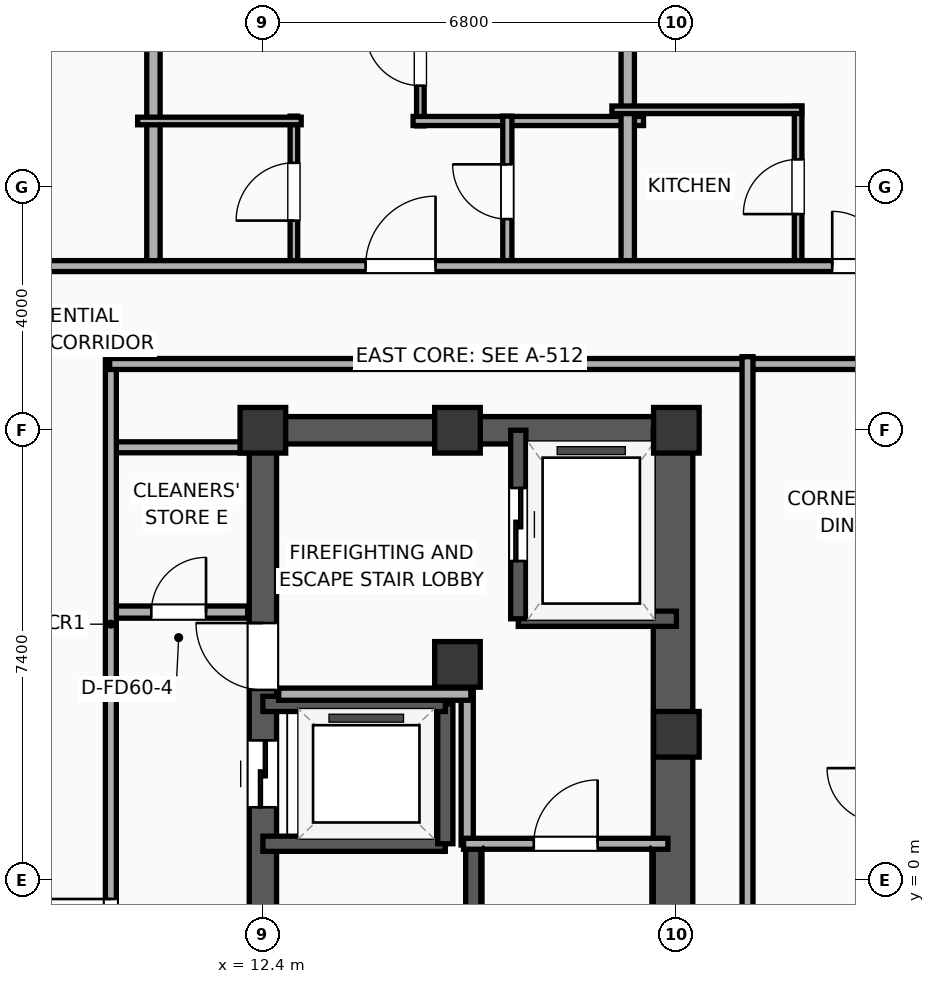
"""IFC4 building model, lengths in metres.
Left out: names, types, materials, properties, quantities, classifications, styles, units other than length and angle.
Written with IfcOpenShell. Run it as: python <this file> out.ifc"""

import sys

from ifc_helpers import new_model, si_unit, direction, frame, frame_2d, origin, origin_2d, place, context, subcontext, project, spatial, rectangle, extrude, element, fill, save


model = new_model("IFC4")
c1 = context("Model", 3, precision=1e-05, world=origin(), true_north=direction((0.0, 1.0)))
c2 = subcontext(c1, "Body", "Model", "MODEL_VIEW")
j1 = project(units=[si_unit("LENGTHUNIT", "METRE"), si_unit("PLANEANGLEUNIT", "RADIAN")], contexts=[c1])
p1 = place(None, origin())
s1 = spatial("IfcSite", under=j1, at=p1, CompositionType="ELEMENT")
p2 = place(p1, origin())
s2 = spatial("IfcBuilding", under=s1, at=p2, CompositionType="ELEMENT")
p3 = place(p2, frame((0.0, 0.0, 260.0)))
s3 = spatial("IfcBuildingStorey", under=s2, at=p3, CompositionType="ELEMENT", Elevation=260.0)
for number, where, z_axis, x_axis in (
    (1, (15.6, 3.55, 0.0), (0.0, 0.0, 1.0), (1.0, 0.0, 0.0)),
    (2, (12.4, 7.4, 0.0), (0.0, 0.0, 1.0), (1.0, 0.0, 0.0)),
    (3, (15.6, 7.4, 0.0), (0.0, 0.0, 1.0), (1.0, 0.0, 0.0)),
    (4, (19.2, 2.4, 0.0), (0.0, 0.0, 1.0), (1.0, 0.0, 0.0)),
    (5, (19.2, 7.4, 0.0), (0.0, 0.0, 1.0), (1.0, 0.0, 0.0)),
):
    element("IfcColumn", number, at=place(p3, frame(where, z_axis=z_axis, x_axis=x_axis)), inside=s3, PredefinedType="COLUMN", context=c2, shape_type="SweptSolid", body=[
        extrude(rectangle(XDim=0.75, YDim=0.75, at=origin_2d()), origin(), (0.0, 0.0, 1.0), 3.9),
    ])
p4 = place(p3, frame((12.175, 7.4, 0.0), z_axis=(0.0, 0.0, 1.0), x_axis=(1.0, 0.0, 0.0)))
e6 = element("IfcWall", 6, at=p4, inside=s3, PredefinedType="SHEAR", context=c2, shape_type="SweptSolid", body=[
    extrude(rectangle(XDim=7.25, YDim=0.45, at=frame_2d((3.625, 0.0))), origin(), (0.0, 0.0, 1.0), 3.65),
])
p5 = place(p3, frame((12.4, -7.4, 0.0), z_axis=(0.0, 0.0, 1.0), x_axis=(0.0, 1.0, 0.0)))
e7 = element("IfcWall", 7, at=p5, inside=s3, PredefinedType="SHEAR", context=c2, shape_type="SweptSolid", body=[
    extrude(rectangle(XDim=14.8, YDim=0.45, at=frame_2d((7.4, 0.0))), origin(), (0.0, 0.0, 1.0), 3.65),
])
p6 = place(p5, frame((8.6, 0.0, 0.0)))
e8 = element("IfcOpeningElement", 8, at=p6, cuts=e7, PredefinedType="OPENING", context=c2, shape_type="SweptSolid", body=[
    extrude(rectangle(XDim=1.1, YDim=2.05, at=frame_2d((0.55, 1.025))), frame((0.0, 0.235, 0.0), z_axis=(0.0, -1.0, 0.0), x_axis=(1.0, 0.0, 0.0)), (0.0, 0.0, 1.0), 0.47),
])
p7 = place(p5, frame((10.53, 0.0, 0.0)))
e9 = element("IfcOpeningElement", 9, at=p7, cuts=e7, PredefinedType="OPENING", context=c2, shape_type="SweptSolid", body=[
    extrude(rectangle(XDim=1.1, YDim=2.05, at=frame_2d((0.55, 1.025))), frame((0.0, 0.235, 0.0), z_axis=(0.0, -1.0, 0.0), x_axis=(1.0, 0.0, 0.0)), (0.0, 0.0, 1.0), 0.47),
])
p8 = place(p5, frame((3.55, 0.0, 0.0)))
e10 = element("IfcOpeningElement", 10, at=p8, cuts=e7, PredefinedType="OPENING", context=c2, shape_type="SweptSolid", body=[
    extrude(rectangle(XDim=0.9, YDim=2.05, at=frame_2d((0.45, 1.025))), frame((0.0, 0.235, 0.0), z_axis=(0.0, -1.0, 0.0), x_axis=(1.0, 0.0, 0.0)), (0.0, 0.0, 1.0), 0.47),
])
p9 = place(p3, frame((19.145, -7.4, 0.0), z_axis=(0.0, 0.0, 1.0), x_axis=(0.0, 1.0, 0.0)))
e11 = element("IfcWall", 11, at=p9, inside=s3, PredefinedType="SHEAR", context=c2, shape_type="SweptSolid", body=[
    extrude(rectangle(XDim=14.8, YDim=0.65, at=frame_2d((7.4, 0.0))), origin(), (0.0, 0.0, 1.0), 3.65),
])
p10 = place(p3, frame((15.86, -7.085, 0.0), z_axis=(0.0, 0.0, 1.0), x_axis=(0.0, 1.0, 0.0)))
e12 = element("IfcWall", 12, at=p10, inside=s3, PredefinedType="SOLIDWALL", context=c2, shape_type="SweptSolid", body=[
    extrude(rectangle(XDim=7.685, YDim=0.25, at=frame_2d((3.843, 0.0))), origin(), (0.0, 0.0, 1.0), 3.65),
])
p11 = place(p3, frame((16.6, 4.3, 0.0), z_axis=(0.0, 0.0, 1.0), x_axis=(1.0, 0.0, 0.0)))
e13 = element("IfcWall", 13, at=p11, inside=s3, PredefinedType="SOLIDWALL", context=c2, shape_type="SweptSolid", body=[
    extrude(rectangle(XDim=2.6, YDim=0.25, at=frame_2d((1.3, 0.0))), origin(), (0.0, 0.0, 1.0), 3.65),
])
p12 = place(p3, frame((16.6, 7.4, 0.0), z_axis=(0.0, 0.0, 1.0), x_axis=(0.0, -1.0, 0.0)))
e14 = element("IfcWall", 14, at=p12, inside=s3, PredefinedType="SOLIDWALL", context=c2, shape_type="SweptSolid", body=[
    extrude(rectangle(XDim=3.1, YDim=0.25, at=frame_2d((1.55, 0.0))), origin(), (0.0, 0.0, 1.0), 3.65),
])
p13 = place(p12, frame((0.95, 0.0, 0.0)))
e15 = element("IfcOpeningElement", 15, at=p13, cuts=e14, PredefinedType="OPENING", context=c2, shape_type="SweptSolid", body=[
    extrude(rectangle(XDim=1.2, YDim=2.05, at=frame_2d((0.6, 1.025))), frame((0.0, 0.135, 0.0), z_axis=(0.0, -1.0, 0.0), x_axis=(1.0, 0.0, 0.0)), (0.0, 0.0, 1.0), 0.27),
])
p14 = place(p3, frame((12.4, 0.6, 0.0), z_axis=(0.0, 0.0, 1.0), x_axis=(1.0, 0.0, 0.0)))
e16 = element("IfcWall", 16, at=p14, inside=s3, PredefinedType="SOLIDWALL", context=c2, shape_type="SweptSolid", body=[
    extrude(rectangle(XDim=3.0, YDim=0.25, at=frame_2d((1.5, 0.0))), origin(), (0.0, 0.0, 1.0), 3.65),
])
p15 = place(p3, frame((15.4, 0.6, 0.0), z_axis=(0.0, 0.0, 1.0), x_axis=(0.0, 1.0, 0.0)))
e17 = element("IfcWall", 17, at=p15, inside=s3, PredefinedType="SOLIDWALL", context=c2, shape_type="SweptSolid", body=[
    extrude(rectangle(XDim=2.3, YDim=0.25, at=frame_2d((1.15, 0.0))), origin(), (0.0, 0.0, 1.0), 3.65),
])
p16 = place(p3, frame((15.4, 2.9, 0.0), z_axis=(0.0, 0.0, 1.0), x_axis=(-1.0, 0.0, 0.0)))
e18 = element("IfcWall", 18, at=p16, inside=s3, PredefinedType="SOLIDWALL", context=c2, shape_type="SweptSolid", body=[
    extrude(rectangle(XDim=3.0, YDim=0.25, at=frame_2d((1.5, 0.0))), origin(), (0.0, 0.0, 1.0), 3.65),
])
p17 = place(p3, frame((15.76, 0.58, 0.0), z_axis=(0.0, 0.0, 1.0), x_axis=(0.0, 1.0, 0.0)))
e19 = element("IfcWall", 19, at=p17, inside=s3, PredefinedType="PARTITIONING", context=c2, shape_type="SweptSolid", body=[
    extrude(rectangle(XDim=2.52, YDim=0.2, at=frame_2d((1.26, 0.0))), origin(), (0.0, 0.0, 1.0), 3.65),
])
p18 = place(p3, frame((12.66, 3.06, 0.0), z_axis=(0.0, 0.0, 1.0), x_axis=(1.0, 0.0, 0.0)))
e20 = element("IfcWall", 20, at=p18, inside=s3, PredefinedType="PARTITIONING", context=c2, shape_type="SweptSolid", body=[
    extrude(rectangle(XDim=3.16, YDim=0.2, at=frame_2d((1.58, 0.0))), origin(), (0.0, 0.0, 1.0), 3.65),
])
p19 = place(p3, frame((15.7, 0.6, 0.0), z_axis=(0.0, 0.0, 1.0), x_axis=(1.0, 0.0, 0.0)))
e21 = element("IfcWall", 21, at=p19, inside=s3, PredefinedType="PARTITIONING", context=c2, shape_type="SweptSolid", body=[
    extrude(rectangle(XDim=3.36, YDim=0.18, at=frame_2d((1.68, 0.0))), origin(), (0.0, 0.0, 1.0), 3.65),
])
p20 = place(p19, frame((1.155, 0.0, 0.0)))
e22 = element("IfcOpeningElement", 22, at=p20, cuts=e21, PredefinedType="OPENING", context=c2, shape_type="SweptSolid", body=[
    extrude(rectangle(XDim=1.05, YDim=2.05, at=frame_2d((0.525, 1.025))), frame((0.0, 0.1, 0.0), z_axis=(0.0, -1.0, 0.0), x_axis=(1.0, 0.0, 0.0)), (0.0, 0.0, 1.0), 0.2),
])
p21 = place(p3, frame((9.88, 4.41, 0.0), z_axis=(0.0, 0.0, 1.0), x_axis=(1.0, 0.0, 0.0)))
e23 = element("IfcWall", 23, at=p21, inside=s3, PredefinedType="PARTITIONING", context=c2, shape_type="SweptSolid", body=[
    extrude(rectangle(XDim=2.27, YDim=0.2, at=frame_2d((1.135, 0.0))), origin(), (0.0, 0.0, 1.0), 3.65),
])
p22 = place(p21, frame((0.685, 0.0, 0.0)))
e24 = element("IfcOpeningElement", 24, at=p22, cuts=e23, PredefinedType="OPENING", context=c2, shape_type="SweptSolid", body=[
    extrude(rectangle(XDim=0.9, YDim=2.05, at=frame_2d((0.45, 1.025))), frame((0.0, 0.11, 0.0), z_axis=(0.0, -1.0, 0.0), x_axis=(1.0, 0.0, 0.0)), (0.0, 0.0, 1.0), 0.22),
])
p23 = place(p3, frame((9.88, 7.12, 0.0), z_axis=(0.0, 0.0, 1.0), x_axis=(1.0, 0.0, 0.0)))
e25 = element("IfcWall", 25, at=p23, inside=s3, PredefinedType="PARTITIONING", context=c2, shape_type="SweptSolid", body=[
    extrude(rectangle(XDim=2.27, YDim=0.18, at=frame_2d((1.135, 0.0))), origin(), (0.0, 0.0, 1.0), 3.65),
])
p24 = place(p3, frame((9.9, -8.58, 0.0), z_axis=(0.0, 0.0, 1.0), x_axis=(0.0, 1.0, 0.0)))
e26 = element("IfcWall", 26, at=p24, inside=s3, PredefinedType="PARTITIONING", context=c2, shape_type="SweptSolid", body=[
    extrude(rectangle(XDim=17.16, YDim=0.18, at=frame_2d((8.58, 0.0))), origin(), (0.0, 0.0, 1.0), 3.65),
])
p25 = place(p24, frame((7.172, 0.0, 0.0)))
e27 = element("IfcOpeningElement", 27, at=p25, cuts=e26, PredefinedType="OPENING", context=c2, shape_type="SweptSolid", body=[
    extrude(rectangle(XDim=1.1, YDim=2.05, at=frame_2d((0.55, 1.025))), frame((0.0, 0.1, 0.0), z_axis=(0.0, -1.0, 0.0), x_axis=(1.0, 0.0, 0.0)), (0.0, 0.0, 1.0), 0.2),
])
p26 = place(p3, frame((9.88, 8.49, 0.0), z_axis=(0.0, 0.0, 1.0), x_axis=(1.0, 0.0, 0.0)))
e28 = element("IfcWall", 28, at=p26, inside=s3, PredefinedType="PARTITIONING", context=c2, shape_type="SweptSolid", body=[
    extrude(rectangle(XDim=15.39, YDim=0.18, at=frame_2d((7.695, 0.0))), origin(), (0.0, 0.0, 1.0), 3.65),
])
p27 = place(p26, frame((12.37, 0.0, 0.0)))
e29 = element("IfcOpeningElement", 29, at=p27, cuts=e28, PredefinedType="OPENING", context=c2, shape_type="SweptSolid", body=[
    extrude(rectangle(XDim=1.15, YDim=2.05, at=frame_2d((0.575, 1.025))), frame((0.0, 0.1, 0.0), z_axis=(0.0, -1.0, 0.0), x_axis=(1.0, 0.0, 0.0)), (0.0, 0.0, 1.0), 0.2),
])
p28 = place(p3, frame((10.6, 10.02, 0.0), z_axis=(0.0, 0.0, 1.0), x_axis=(0.0, 1.0, 0.0)))
e30 = element("IfcWall", 30, at=p28, inside=s3, PredefinedType="PARTITIONING", context=c2, shape_type="SweptSolid", body=[
    extrude(rectangle(XDim=7.325, YDim=0.22, at=frame_2d((3.663, 0.0))), origin(), (0.0, 0.0, 1.0), 3.65),
])
p29 = place(p3, frame((14.99, 12.406, 0.0), z_axis=(0.0, 0.0, 1.0), x_axis=(0.0, 1.0, 0.0)))
e31 = element("IfcWall", 31, at=p29, inside=s3, PredefinedType="PARTITIONING", context=c2, shape_type="SweptSolid", body=[
    extrude(rectangle(XDim=4.629, YDim=0.125, at=frame_2d((2.314, 0.0))), origin(), (0.0, 0.0, 1.0), 3.65),
])
p30 = place(p29, frame((0.661, 0.0, 0.0)))
e32 = element("IfcOpeningElement", 32, at=p30, cuts=e31, PredefinedType="OPENING", context=c2, shape_type="SweptSolid", body=[
    extrude(rectangle(XDim=0.9, YDim=2.05, at=frame_2d((0.45, 1.025))), frame((0.0, 0.073, 0.0), z_axis=(0.0, -1.0, 0.0), x_axis=(1.0, 0.0, 0.0)), (0.0, 0.0, 1.0), 0.145),
])
p31 = place(p3, frame((14.87, 12.486, 0.0), z_axis=(0.0, 0.0, 1.0), x_axis=(1.0, 0.0, 0.0)))
e33 = element("IfcWall", 33, at=p31, inside=s3, PredefinedType="PLUMBINGWALL", context=c2, shape_type="SweptSolid", body=[
    extrude(rectangle(XDim=3.79, YDim=0.15, at=frame_2d((1.895, 0.0))), origin(), (0.0, 0.0, 1.0), 3.65),
])
p32 = place(p3, frame((12.91, 10.08, 0.0), z_axis=(0.0, 0.0, 1.0), x_axis=(0.0, 1.0, 0.0)))
e34 = element("IfcWall", 34, at=p32, inside=s3, PredefinedType="PARTITIONING", context=c2, shape_type="SweptSolid", body=[
    extrude(rectangle(XDim=2.486, YDim=0.125, at=frame_2d((1.243, 0.0))), origin(), (0.0, 0.0, 1.0), 2.54),
])
p33 = place(p32, frame((0.768, 0.0, 0.0)))
e35 = element("IfcOpeningElement", 35, at=p33, cuts=e34, PredefinedType="OPENING", context=c2, shape_type="SweptSolid", body=[
    extrude(rectangle(XDim=0.95, YDim=2.05, at=frame_2d((0.475, 1.025))), frame((0.0, 0.073, 0.0), z_axis=(0.0, -1.0, 0.0), x_axis=(1.0, 0.0, 0.0)), (0.0, 0.0, 1.0), 0.145),
])
p34 = place(p3, frame((10.34, 12.486, 0.0), z_axis=(0.0, 0.0, 1.0), x_axis=(1.0, 0.0, 0.0)))
e36 = element("IfcWall", 36, at=p34, inside=s3, PredefinedType="PARTITIONING", context=c2, shape_type="SweptSolid", body=[
    extrude(rectangle(XDim=2.69, YDim=0.125, at=frame_2d((1.345, 0.0))), origin(), (0.0, 0.0, 1.0), 3.65),
])
p35 = place(p3, frame((16.42, 10.08, 0.0), z_axis=(0.0, 0.0, 1.0), x_axis=(0.0, 1.0, 0.0)))
e37 = element("IfcWall", 37, at=p35, inside=s3, PredefinedType="PLUMBINGWALL", context=c2, shape_type="SweptSolid", body=[
    extrude(rectangle(XDim=2.486, YDim=0.15, at=frame_2d((1.243, 0.0))), origin(), (0.0, 0.0, 1.0), 3.65),
])
p36 = place(p35, frame((0.793, 0.0, 0.0)))
e38 = element("IfcOpeningElement", 38, at=p36, cuts=e37, PredefinedType="OPENING", context=c2, shape_type="SweptSolid", body=[
    extrude(rectangle(XDim=0.9, YDim=2.05, at=frame_2d((0.45, 1.025))), frame((0.0, 0.085, 0.0), z_axis=(0.0, -1.0, 0.0), x_axis=(1.0, 0.0, 0.0)), (0.0, 0.0, 1.0), 0.17),
])
p37 = place(p3, frame((18.4, 10.02, 0.0), z_axis=(0.0, 0.0, 1.0), x_axis=(0.0, 1.0, 0.0)))
e39 = element("IfcWall", 39, at=p37, inside=s3, PredefinedType="PARTITIONING", context=c2, shape_type="SweptSolid", body=[
    extrude(rectangle(XDim=6.505, YDim=0.22, at=frame_2d((3.253, 0.0))), origin(), (0.0, 0.0, 1.0), 3.65),
])
p38 = place(p3, frame((21.202, 10.08, 0.0), z_axis=(0.0, 0.0, 1.0), x_axis=(0.0, 1.0, 0.0)))
e40 = element("IfcWall", 40, at=p38, inside=s3, PredefinedType="PARTITIONING", context=c2, shape_type="SweptSolid", body=[
    extrude(rectangle(XDim=2.65, YDim=0.125, at=frame_2d((1.325, 0.0))), origin(), (0.0, 0.0, 1.0), 2.54),
])
p39 = place(p38, frame((0.875, 0.0, 0.0)))
e41 = element("IfcOpeningElement", 41, at=p39, cuts=e40, PredefinedType="OPENING", context=c2, shape_type="SweptSolid", body=[
    extrude(rectangle(XDim=0.9, YDim=2.05, at=frame_2d((0.45, 1.025))), frame((0.0, 0.073, 0.0), z_axis=(0.0, -1.0, 0.0), x_axis=(1.0, 0.0, 0.0)), (0.0, 0.0, 1.0), 0.145),
])
p40 = place(p3, frame((18.14, 12.67, 0.0), z_axis=(0.0, 0.0, 1.0), x_axis=(1.0, 0.0, 0.0)))
e42 = element("IfcWall", 42, at=p40, inside=s3, PredefinedType="PARTITIONING", context=c2, shape_type="SweptSolid", body=[
    extrude(rectangle(XDim=3.122, YDim=0.125, at=frame_2d((1.561, 0.0))), origin(), (0.0, 0.0, 1.0), 3.65),
])
p41 = place(p3, frame((-28.516, 10.1, 0.0), z_axis=(0.0, 0.0, 1.0), x_axis=(1.0, 0.0, 0.0)))
e43 = element("IfcWall", 43, at=p41, inside=s3, PredefinedType="PARTITIONING", context=c2, shape_type="SweptSolid", body=[
    extrude(rectangle(XDim=53.955, YDim=0.18, at=frame_2d((26.978, 0.0))), origin(), (0.0, 0.0, 1.0), 3.65),
])
p42 = place(p41, frame((3.515, 0.0, 0.0)))
e44 = element("IfcOpeningElement", 44, at=p42, cuts=e43, PredefinedType="OPENING", context=c2, shape_type="SweptSolid", body=[
    extrude(rectangle(XDim=1.15, YDim=2.05, at=frame_2d((0.575, 1.025))), frame((0.0, 0.1, 0.0), z_axis=(0.0, -1.0, 0.0), x_axis=(1.0, 0.0, 0.0)), (0.0, 0.0, 1.0), 0.2),
])
p43 = place(p41, frame((11.408, 0.0, 0.0)))
e45 = element("IfcOpeningElement", 45, at=p43, cuts=e43, PredefinedType="OPENING", context=c2, shape_type="SweptSolid", body=[
    extrude(rectangle(XDim=1.15, YDim=2.05, at=frame_2d((0.575, 1.025))), frame((0.0, 0.1, 0.0), z_axis=(0.0, -1.0, 0.0), x_axis=(1.0, 0.0, 0.0)), (0.0, 0.0, 1.0), 0.2),
])
p44 = place(p41, frame((19.205, 0.0, 0.0)))
e46 = element("IfcOpeningElement", 46, at=p44, cuts=e43, PredefinedType="OPENING", context=c2, shape_type="SweptSolid", body=[
    extrude(rectangle(XDim=1.15, YDim=2.05, at=frame_2d((0.575, 1.025))), frame((0.0, 0.1, 0.0), z_axis=(0.0, -1.0, 0.0), x_axis=(1.0, 0.0, 0.0)), (0.0, 0.0, 1.0), 0.2),
])
p45 = place(p41, frame((27.159, 0.0, 0.0)))
e47 = element("IfcOpeningElement", 47, at=p45, cuts=e43, PredefinedType="OPENING", context=c2, shape_type="SweptSolid", body=[
    extrude(rectangle(XDim=0.9, YDim=2.05, at=frame_2d((0.45, 1.025))), frame((0.0, 0.1, 0.0), z_axis=(0.0, -1.0, 0.0), x_axis=(1.0, 0.0, 0.0)), (0.0, 0.0, 1.0), 0.2),
])
p46 = place(p41, frame((34.642, 0.0, 0.0)))
e48 = element("IfcOpeningElement", 48, at=p46, cuts=e43, PredefinedType="OPENING", context=c2, shape_type="SweptSolid", body=[
    extrude(rectangle(XDim=1.15, YDim=2.05, at=frame_2d((0.575, 1.025))), frame((0.0, 0.1, 0.0), z_axis=(0.0, -1.0, 0.0), x_axis=(1.0, 0.0, 0.0)), (0.0, 0.0, 1.0), 0.2),
])
p47 = place(p41, frame((42.606, 0.0, 0.0)))
e49 = element("IfcOpeningElement", 49, at=p47, cuts=e43, PredefinedType="OPENING", context=c2, shape_type="SweptSolid", body=[
    extrude(rectangle(XDim=1.15, YDim=2.05, at=frame_2d((0.575, 1.025))), frame((0.0, 0.1, 0.0), z_axis=(0.0, -1.0, 0.0), x_axis=(1.0, 0.0, 0.0)), (0.0, 0.0, 1.0), 0.2),
])
p48 = place(p41, frame((50.279, 0.0, 0.0)))
e50 = element("IfcOpeningElement", 50, at=p48, cuts=e43, PredefinedType="OPENING", context=c2, shape_type="SweptSolid", body=[
    extrude(rectangle(XDim=0.9, YDim=2.05, at=frame_2d((0.45, 1.025))), frame((0.0, 0.1, 0.0), z_axis=(0.0, -1.0, 0.0), x_axis=(1.0, 0.0, 0.0)), (0.0, 0.0, 1.0), 0.2),
])
p49 = place(p3, frame((20.37, -8.61, 0.0), z_axis=(0.0, 0.0, 1.0), x_axis=(0.0, 1.0, 0.0)))
e51 = element("IfcWall", 51, at=p49, inside=s3, PredefinedType="PARTITIONING", context=c2, shape_type="SweptSolid", body=[
    extrude(rectangle(XDim=17.22, YDim=0.18, at=frame_2d((8.61, 0.0))), origin(), (0.0, 0.0, 1.0), 3.65),
])
p50 = place(p13, origin())
e52 = element("IfcDoor", 52, at=p50, inside=s3, OperationType="SLIDING_TO_LEFT", PredefinedType="DOOR", context=c2, shape_type="SweptSolid", body=[
    extrude(rectangle(XDim=1.2, YDim=2.05, at=frame_2d((0.6, 1.025))), frame((0.0, 0.025, 0.0), z_axis=(0.0, -1.0, 0.0), x_axis=(1.0, 0.0, 0.0)), (0.0, 0.0, 1.0), 0.05),
])
fill(e15, e52)
p51 = place(p6, origin())
e53 = element("IfcDoor", 53, at=p51, inside=s3, OperationType="SLIDING_TO_LEFT", PredefinedType="DOOR", context=c2, shape_type="SweptSolid", body=[
    extrude(rectangle(XDim=1.1, YDim=2.05, at=frame_2d((0.55, 1.025))), frame((0.0, 0.025, 0.0), z_axis=(0.0, -1.0, 0.0), x_axis=(1.0, 0.0, 0.0)), (0.0, 0.0, 1.0), 0.05),
])
fill(e8, e53)
p52 = place(p20, origin())
e54 = element("IfcDoor", 54, at=p52, inside=s3, OperationType="SINGLE_SWING_RIGHT", PredefinedType="DOOR", context=c2, shape_type="SweptSolid", body=[
    extrude(rectangle(XDim=1.05, YDim=2.05, at=frame_2d((0.525, 1.025))), frame((0.0, 0.025, 0.0), z_axis=(0.0, -1.0, 0.0), x_axis=(1.0, 0.0, 0.0)), (0.0, 0.0, 1.0), 0.05),
])
fill(e22, e54)
p53 = place(p22, origin())
e55 = element("IfcDoor", 55, at=p53, inside=s3, OperationType="SINGLE_SWING_RIGHT", PredefinedType="DOOR", context=c2, shape_type="SweptSolid", body=[
    extrude(rectangle(XDim=0.9, YDim=2.05, at=frame_2d((0.45, 1.025))), frame((0.0, 0.025, 0.0), z_axis=(0.0, -1.0, 0.0), x_axis=(1.0, 0.0, 0.0)), (0.0, 0.0, 1.0), 0.05),
])
fill(e24, e55)
p54 = place(p25, origin())
e56 = element("IfcDoor", 56, at=p54, inside=s3, OperationType="SINGLE_SWING_RIGHT", PredefinedType="DOOR", context=c2, shape_type="SweptSolid", body=[
    extrude(rectangle(XDim=1.1, YDim=2.05, at=frame_2d((0.55, 1.025))), frame((0.0, 0.025, 0.0), z_axis=(0.0, -1.0, 0.0), x_axis=(1.0, 0.0, 0.0)), (0.0, 0.0, 1.0), 0.05),
])
fill(e27, e56)
p55 = place(p30, origin())
e57 = element("IfcDoor", 57, at=p55, inside=s3, OperationType="SINGLE_SWING_RIGHT", PredefinedType="DOOR", context=c2, shape_type="SweptSolid", body=[
    extrude(rectangle(XDim=0.9, YDim=2.05, at=frame_2d((0.45, 1.025))), frame((0.0, 0.025, 0.0), z_axis=(0.0, -1.0, 0.0), x_axis=(1.0, 0.0, 0.0)), (0.0, 0.0, 1.0), 0.05),
])
fill(e32, e57)
p56 = place(p33, origin())
e58 = element("IfcDoor", 58, at=p56, inside=s3, OperationType="SINGLE_SWING_LEFT", PredefinedType="DOOR", context=c2, shape_type="SweptSolid", body=[
    extrude(rectangle(XDim=0.95, YDim=2.05, at=frame_2d((0.475, 1.025))), frame((0.0, 0.025, 0.0), z_axis=(0.0, -1.0, 0.0), x_axis=(1.0, 0.0, 0.0)), (0.0, 0.0, 1.0), 0.05),
])
fill(e35, e58)
p57 = place(p36, origin())
e59 = element("IfcDoor", 59, at=p57, inside=s3, OperationType="SINGLE_SWING_RIGHT", PredefinedType="DOOR", context=c2, shape_type="SweptSolid", body=[
    extrude(rectangle(XDim=0.9, YDim=2.05, at=frame_2d((0.45, 1.025))), frame((0.0, 0.025, 0.0), z_axis=(0.0, -1.0, 0.0), x_axis=(1.0, 0.0, 0.0)), (0.0, 0.0, 1.0), 0.05),
])
fill(e38, e59)
p58 = place(p39, origin())
e60 = element("IfcDoor", 60, at=p58, inside=s3, OperationType="SINGLE_SWING_LEFT", PredefinedType="DOOR", context=c2, shape_type="SweptSolid", body=[
    extrude(rectangle(XDim=0.9, YDim=2.05, at=frame_2d((0.45, 1.025))), frame((0.0, 0.025, 0.0), z_axis=(0.0, -1.0, 0.0), x_axis=(1.0, 0.0, 0.0)), (0.0, 0.0, 1.0), 0.05),
])
fill(e41, e60)
p59 = place(p47, origin())
e61 = element("IfcDoor", 61, at=p59, inside=s3, OperationType="SINGLE_SWING_RIGHT", PredefinedType="DOOR", context=c2, shape_type="SweptSolid", body=[
    extrude(rectangle(XDim=1.15, YDim=2.05, at=frame_2d((0.575, 1.025))), frame((0.0, 0.025, 0.0), z_axis=(0.0, -1.0, 0.0), x_axis=(1.0, 0.0, 0.0)), (0.0, 0.0, 1.0), 0.05),
])
fill(e49, e61)
p60 = place(p48, origin())
e62 = element("IfcDoor", 62, at=p60, inside=s3, OperationType="SINGLE_SWING_LEFT", PredefinedType="DOOR", context=c2, shape_type="SweptSolid", body=[
    extrude(rectangle(XDim=0.9, YDim=2.05, at=frame_2d((0.45, 1.025))), frame((0.0, 0.025, 0.0), z_axis=(0.0, -1.0, 0.0), x_axis=(1.0, 0.0, 0.0)), (0.0, 0.0, 1.0), 0.05),
])
fill(e50, e62)
p61 = place(p7, origin())
e63 = element("IfcDoor", 63, at=p61, inside=s3, OperationType="SINGLE_SWING_RIGHT", PredefinedType="DOOR", context=c2, shape_type="SweptSolid", body=[
    extrude(rectangle(XDim=1.1, YDim=2.05, at=frame_2d((0.55, 1.025))), frame((0.0, 0.025, 0.0), z_axis=(0.0, -1.0, 0.0), x_axis=(1.0, 0.0, 0.0)), (0.0, 0.0, 1.0), 0.05),
])
fill(e9, e63)
save(model, sys.argv[1])
